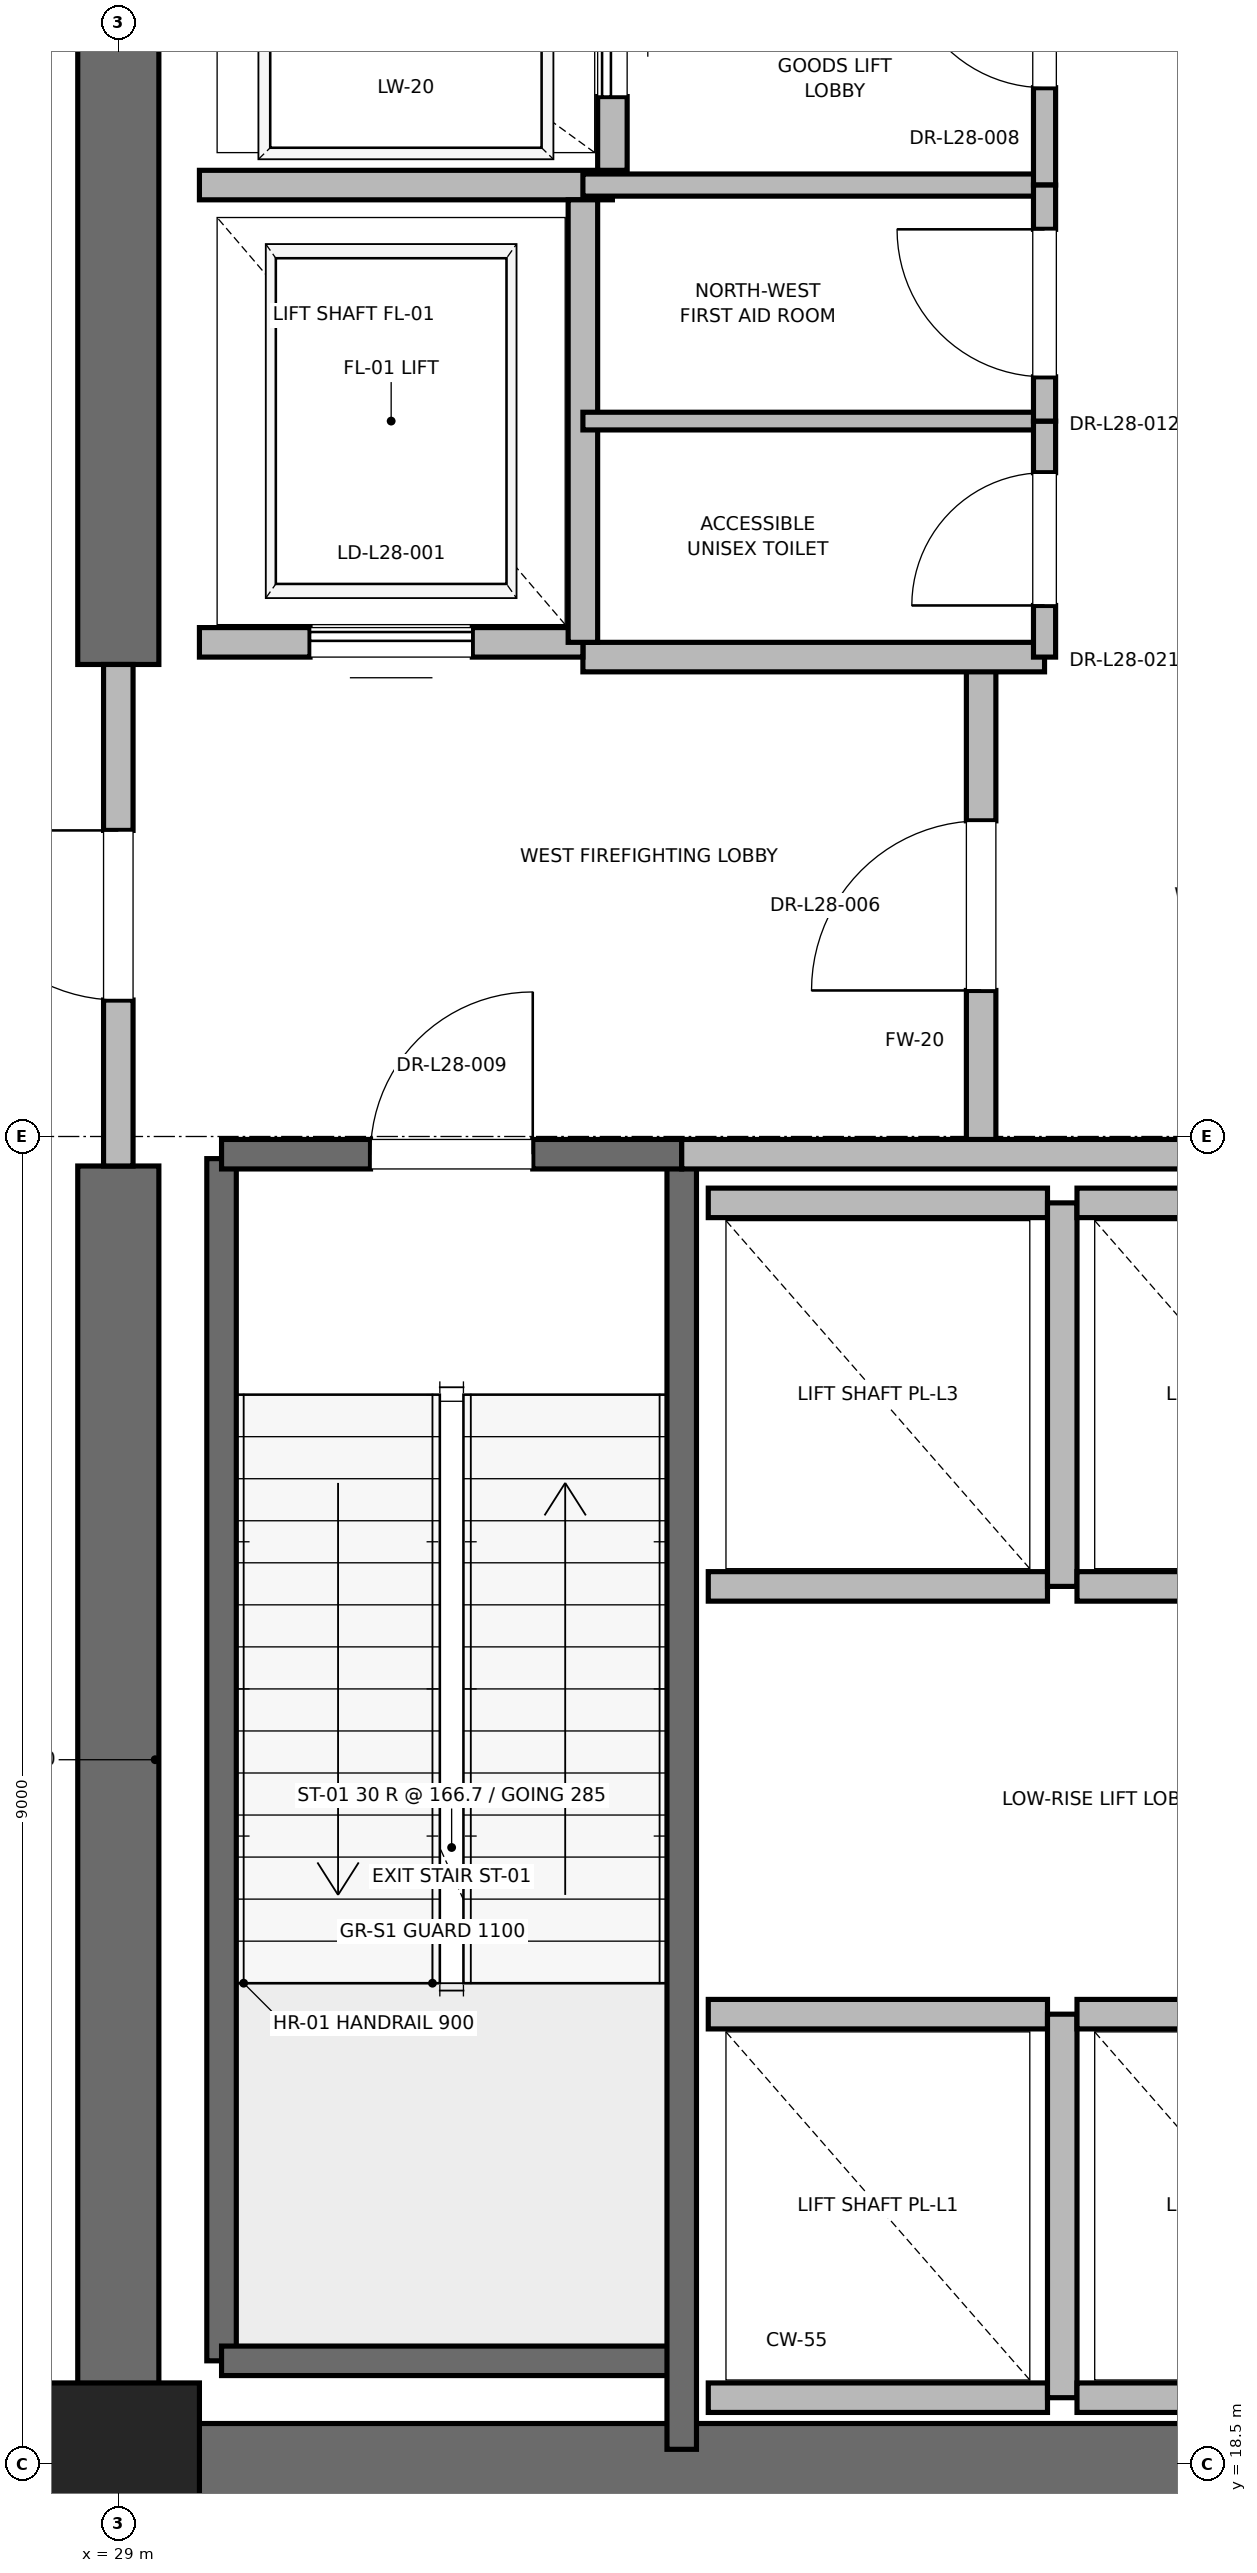
"""IFC4 building model, lengths in metres.
Left out: names, types, materials, properties, quantities, classifications, styles, units other than length and angle.
Written with IfcOpenShell. Run it as: python <this file> out.ifc"""

import sys

from ifc_helpers import new_model, si_unit, direction, frame, frame_2d, origin, origin_2d, place, context, subcontext, project, spatial, rectangle, extrude, element, fill, save


model = new_model("IFC4")
c1 = context("Model", 3, precision=1e-05, world=origin(), true_north=direction((0.0, 1.0)))
c2 = subcontext(c1, "Body", "Model", "MODEL_VIEW")
j1 = project(units=[si_unit("LENGTHUNIT", "METRE"), si_unit("PLANEANGLEUNIT", "RADIAN")], contexts=[c1])
p1 = place(None, origin())
s1 = spatial("IfcSite", under=j1, at=p1, CompositionType="ELEMENT")
p2 = place(p1, origin())
s2 = spatial("IfcBuilding", under=s1, at=p2, CompositionType="ELEMENT")
p3 = place(p2, frame((0.0, 0.0, 123.4)))
s3 = spatial("IfcBuildingStorey", under=s2, at=p3, CompositionType="ELEMENT", Elevation=123.4)
p4 = place(p3, frame((29.0, 18.5, 0.0), z_axis=(0.0, 0.0, 1.0), x_axis=(1.0, 0.0, 0.0)))
e1 = element("IfcColumn", 1, at=p4, inside=s3, PredefinedType="PILASTER", context=c2, shape_type="SweptSolid", body=[
    extrude(rectangle(XDim=1.1, YDim=1.1, at=origin_2d()), origin(), (0.0, 0.0, 1.0), 5.0),
])
p5 = place(p3, frame((29.0, 18.5, 0.0), z_axis=(0.0, 0.0, 1.0), x_axis=(1.0, 0.0, 0.0)))
e2 = element("IfcWall", 2, at=p5, inside=s3, PredefinedType="SHEAR", context=c2, shape_type="SweptSolid", body=[
    extrude(rectangle(XDim=9.2, YDim=0.55, at=frame_2d((4.6, 0.0))), origin(), (0.0, 0.0, 1.0), 4.775),
])
p6 = place(p3, frame((29.0, 18.5, 0.0), z_axis=(0.0, 0.0, 1.0), x_axis=(0.0, 1.0, 0.0)))
e3 = element("IfcWall", 3, at=p6, inside=s3, PredefinedType="SHEAR", context=c2, shape_type="SweptSolid", body=[
    extrude(rectangle(XDim=8.8, YDim=0.55, at=frame_2d((4.4, 0.0))), origin(), (0.0, 0.0, 1.0), 4.775),
])
p7 = place(p3, frame((29.0, 30.7, 0.0), z_axis=(0.0, 0.0, 1.0), x_axis=(0.0, 1.0, 0.0)))
e4 = element("IfcWall", 4, at=p7, inside=s3, PredefinedType="SHEAR", context=c2, shape_type="SweptSolid", body=[
    extrude(rectangle(XDim=5.8, YDim=0.55, at=frame_2d((2.9, 0.0))), origin(), (0.0, 0.0, 1.0), 4.775),
])
p8 = place(p3, frame((29.7, 19.2, 0.0), z_axis=(0.0, 0.0, 1.0), x_axis=(0.0, 1.0, 0.0)))
e5 = element("IfcWall", 5, at=p8, inside=s3, PredefinedType="SOLIDWALL", context=c2, shape_type="SweptSolid", body=[
    extrude(rectangle(XDim=8.15, YDim=0.2, at=frame_2d((4.075, 0.0))), origin(), (0.0, 0.0, 1.0), 4.775),
])
p9 = place(p3, frame((29.7, 19.2, 0.0), z_axis=(0.0, 0.0, 1.0), x_axis=(1.0, 0.0, 0.0)))
e6 = element("IfcWall", 6, at=p9, inside=s3, PredefinedType="SOLIDWALL", context=c2, shape_type="SweptSolid", body=[
    extrude(rectangle(XDim=3.12, YDim=0.2, at=frame_2d((1.56, 0.0))), origin(), (0.0, 0.0, 1.0), 4.775),
])
p10 = place(p3, frame((32.82, 18.6, 0.0), z_axis=(0.0, 0.0, 1.0), x_axis=(0.0, 1.0, 0.0)))
e7 = element("IfcWall", 7, at=p10, inside=s3, PredefinedType="SOLIDWALL", context=c2, shape_type="SweptSolid", body=[
    extrude(rectangle(XDim=8.78, YDim=0.2, at=frame_2d((4.39, 0.0))), origin(), (0.0, 0.0, 1.0), 4.775),
])
p11 = place(p3, frame((29.7, 27.38, 0.0), z_axis=(0.0, 0.0, 1.0), x_axis=(1.0, 0.0, 0.0)))
e8 = element("IfcWall", 8, at=p11, inside=s3, PredefinedType="SOLIDWALL", context=c2, shape_type="SweptSolid", body=[
    extrude(rectangle(XDim=3.12, YDim=0.2, at=frame_2d((1.56, 0.0))), origin(), (0.0, 0.0, 1.0), 4.775),
])
p12 = place(p11, frame((1.01, 0.0, 0.0)))
e9 = element("IfcOpeningElement", 9, at=p12, cuts=e8, PredefinedType="OPENING", context=c2, shape_type="SweptSolid", body=[
    extrude(rectangle(XDim=1.1, YDim=2.15, at=frame_2d((0.55, 1.075))), frame((0.0, 0.1, 0.0), z_axis=(0.0, -1.0, 0.0), x_axis=(1.0, 0.0, 0.0)), (0.0, 0.0, 1.0), 0.2),
])
p13 = place(p3, frame((34.85, 27.38, 0.0), z_axis=(0.0, 0.0, 1.0), x_axis=(0.0, 1.0, 0.0)))
e10 = element("IfcWall", 10, at=p13, inside=s3, PredefinedType="PARTITIONING", context=c2, shape_type="SweptSolid", body=[
    extrude(rectangle(XDim=3.37, YDim=0.2, at=frame_2d((1.685, 0.0))), origin(), (0.0, 0.0, 1.0), 4.775),
])
p14 = place(p13, frame((1.11, 0.0, 0.0)))
e11 = element("IfcOpeningElement", 11, at=p14, cuts=e10, PredefinedType="OPENING", context=c2, shape_type="SweptSolid", body=[
    extrude(rectangle(XDim=1.15, YDim=2.2, at=frame_2d((0.575, 1.1))), frame((0.0, 0.1, 0.0), z_axis=(0.0, -1.0, 0.0), x_axis=(1.0, 0.0, 0.0)), (0.0, 0.0, 1.0), 0.2),
])
p15 = place(p3, frame((29.0, 27.3, 0.0), z_axis=(0.0, 0.0, 1.0), x_axis=(0.0, 1.0, 0.0)))
e12 = element("IfcWall", 12, at=p15, inside=s3, PredefinedType="PARTITIONING", context=c2, shape_type="SweptSolid", body=[
    extrude(rectangle(XDim=3.4, YDim=0.2, at=frame_2d((1.7, 0.0))), origin(), (0.0, 0.0, 1.0), 3.755),
])
p16 = place(p15, frame((1.125, 0.0, 0.0)))
e13 = element("IfcOpeningElement", 13, at=p16, cuts=e12, PredefinedType="OPENING", context=c2, shape_type="SweptSolid", body=[
    extrude(rectangle(XDim=1.15, YDim=2.2, at=frame_2d((0.575, 1.1))), frame((0.0, 0.1, 0.0), z_axis=(0.0, -1.0, 0.0), x_axis=(1.0, 0.0, 0.0)), (0.0, 0.0, 1.0), 0.2),
])
p17 = place(p3, frame((32.82, 27.38, 0.0), z_axis=(0.0, 0.0, 1.0), x_axis=(1.0, 0.0, 0.0)))
e14 = element("IfcWall", 14, at=p17, inside=s3, PredefinedType="PARTITIONING", context=c2, shape_type="SweptSolid", body=[
    extrude(rectangle(XDim=5.62, YDim=0.2, at=frame_2d((2.81, 0.0))), origin(), (0.0, 0.0, 1.0), 4.775),
])
p18 = place(p3, frame((32.15, 30.75, 0.0), z_axis=(0.0, 0.0, 1.0), x_axis=(1.0, 0.0, 0.0)))
e15 = element("IfcWall", 15, at=p18, inside=s3, PredefinedType="PARTITIONING", context=c2, shape_type="SweptSolid", body=[
    extrude(rectangle(XDim=3.13, YDim=0.2, at=frame_2d((1.565, 0.0))), origin(), (0.0, 0.0, 1.0), 4.775),
])
p19 = place(p3, frame((29.55, 30.85, 0.0), z_axis=(0.0, 0.0, 1.0), x_axis=(1.0, 0.0, 0.0)))
e16 = element("IfcWall", 16, at=p19, inside=s3, PredefinedType="SOLIDWALL", context=c2, shape_type="SweptSolid", body=[
    extrude(rectangle(XDim=2.6, YDim=0.2, at=frame_2d((1.3, 0.0))), origin(), (0.0, 0.0, 1.0), 3.755),
])
p20 = place(p19, frame((0.75, 0.0, 0.0)))
e17 = element("IfcOpeningElement", 17, at=p20, cuts=e16, PredefinedType="OPENING", context=c2, shape_type="SweptSolid", body=[
    extrude(rectangle(XDim=1.1, YDim=2.2, at=frame_2d((0.55, 1.1))), frame((0.0, 0.1, 0.0), z_axis=(0.0, -1.0, 0.0), x_axis=(1.0, 0.0, 0.0)), (0.0, 0.0, 1.0), 0.2),
])
p21 = place(p3, frame((29.55, 33.95, 0.0), z_axis=(0.0, 0.0, 1.0), x_axis=(1.0, 0.0, 0.0)))
e18 = element("IfcWall", 18, at=p21, inside=s3, PredefinedType="SOLIDWALL", context=c2, shape_type="SweptSolid", body=[
    extrude(rectangle(XDim=2.8, YDim=0.2, at=frame_2d((1.4, 0.0))), origin(), (0.0, 0.0, 1.0), 4.775),
])
p22 = place(p3, frame((32.15, 30.85, 0.0), z_axis=(0.0, 0.0, 1.0), x_axis=(0.0, 1.0, 0.0)))
e19 = element("IfcWall", 19, at=p22, inside=s3, PredefinedType="SOLIDWALL", context=c2, shape_type="SweptSolid", body=[
    extrude(rectangle(XDim=3.0, YDim=0.2, at=frame_2d((1.5, 0.0))), origin(), (0.0, 0.0, 1.0), 4.775),
])
p23 = place(p3, frame((32.35, 34.05, 0.0), z_axis=(0.0, 0.0, 1.0), x_axis=(0.0, 1.0, 0.0)))
e20 = element("IfcWall", 20, at=p23, inside=s3, PredefinedType="SOLIDWALL", context=c2, shape_type="SweptSolid", body=[
    extrude(rectangle(XDim=2.1, YDim=0.2, at=frame_2d((1.05, 0.0))), origin(), (0.0, 0.0, 1.0), 4.775),
])
p24 = place(p23, frame((0.5, 0.0, 0.0)))
e21 = element("IfcOpeningElement", 21, at=p24, cuts=e20, PredefinedType="OPENING", context=c2, shape_type="SweptSolid", body=[
    extrude(rectangle(XDim=1.1, YDim=2.2, at=frame_2d((0.55, 1.1))), frame((0.0, 0.1, 0.0), z_axis=(0.0, -1.0, 0.0), x_axis=(1.0, 0.0, 0.0)), (0.0, 0.0, 1.0), 0.2),
])
for number, where, z_axis, x_axis in (
    (22, (33.0, 18.95, 0.0), (0.0, 0.0, 1.0), (1.0, 0.0, 0.0)),
    (23, (35.3, 21.55, 0.0), (0.0, 0.0, 1.0), (-1.0, 0.0, 0.0)),
):
    element("IfcWall", number, at=place(p3, frame(where, z_axis=z_axis, x_axis=x_axis)), inside=s3, PredefinedType="SOLIDWALL", context=c2, shape_type="SweptSolid", body=[
        extrude(rectangle(XDim=2.3, YDim=0.2, at=frame_2d((1.15, 0.0))), origin(), (0.0, 0.0, 1.0), 4.775),
    ])
p25 = place(p3, frame((35.4, 18.95, 0.0), z_axis=(0.0, 0.0, 1.0), x_axis=(0.0, 1.0, 0.0)))
e24 = element("IfcWall", 24, at=p25, inside=s3, PredefinedType="SOLIDWALL", context=c2, shape_type="SweptSolid", body=[
    extrude(rectangle(XDim=2.6, YDim=0.2, at=frame_2d((1.3, 0.0))), origin(), (0.0, 0.0, 1.0), 4.775),
])
p26 = place(p3, frame((35.5, 18.95, 0.0), z_axis=(0.0, 0.0, 1.0), x_axis=(1.0, 0.0, 0.0)))
e25 = element("IfcWall", 25, at=p26, inside=s3, PredefinedType="SOLIDWALL", context=c2, shape_type="SweptSolid", body=[
    extrude(rectangle(XDim=2.3, YDim=0.2, at=frame_2d((1.15, 0.0))), origin(), (0.0, 0.0, 1.0), 3.755),
])
for number, where, z_axis, x_axis in (
    (26, (37.8, 21.55, 0.0), (0.0, 0.0, 1.0), (-1.0, 0.0, 0.0)),
    (27, (33.0, 24.45, 0.0), (0.0, 0.0, 1.0), (1.0, 0.0, 0.0)),
    (28, (35.3, 27.05, 0.0), (0.0, 0.0, 1.0), (-1.0, 0.0, 0.0)),
):
    element("IfcWall", number, at=place(p3, frame(where, z_axis=z_axis, x_axis=x_axis)), inside=s3, PredefinedType="SOLIDWALL", context=c2, shape_type="SweptSolid", body=[
        extrude(rectangle(XDim=2.3, YDim=0.2, at=frame_2d((1.15, 0.0))), origin(), (0.0, 0.0, 1.0), 4.775),
    ])
p27 = place(p3, frame((35.4, 24.45, 0.0), z_axis=(0.0, 0.0, 1.0), x_axis=(0.0, 1.0, 0.0)))
e29 = element("IfcWall", 29, at=p27, inside=s3, PredefinedType="SOLIDWALL", context=c2, shape_type="SweptSolid", body=[
    extrude(rectangle(XDim=2.6, YDim=0.2, at=frame_2d((1.3, 0.0))), origin(), (0.0, 0.0, 1.0), 4.775),
])
for number, where, z_axis, x_axis in (
    (30, (35.5, 24.45, 0.0), (0.0, 0.0, 1.0), (1.0, 0.0, 0.0)),
    (31, (37.8, 27.05, 0.0), (0.0, 0.0, 1.0), (-1.0, 0.0, 0.0)),
):
    element("IfcWall", number, at=place(p3, frame(where, z_axis=z_axis, x_axis=x_axis)), inside=s3, PredefinedType="SOLIDWALL", context=c2, shape_type="SweptSolid", body=[
        extrude(rectangle(XDim=2.3, YDim=0.2, at=frame_2d((1.15, 0.0))), origin(), (0.0, 0.0, 1.0), 4.775),
    ])
p28 = place(p3, frame((32.15, 33.95, 0.0), z_axis=(0.0, 0.0, 1.0), x_axis=(1.0, 0.0, 0.0)))
e32 = element("IfcWall", 32, at=p28, inside=s3, PredefinedType="PARTITIONING", context=c2, shape_type="SweptSolid", body=[
    extrude(rectangle(XDim=3.13, YDim=0.15, at=frame_2d((1.565, 0.0))), origin(), (0.0, 0.0, 1.0), 2.85),
])
p29 = place(p3, frame((35.28, 33.95, 0.0), z_axis=(0.0, 0.0, 1.0), x_axis=(0.0, 1.0, 0.0)))
e33 = element("IfcWall", 33, at=p29, inside=s3, PredefinedType="PARTITIONING", context=c2, shape_type="SweptSolid", body=[
    extrude(rectangle(XDim=2.27, YDim=0.15, at=frame_2d((1.135, 0.0))), origin(), (0.0, 0.0, 1.0), 2.85),
])
p30 = place(p29, frame((0.66, 0.0, 0.0)))
e34 = element("IfcOpeningElement", 34, at=p30, cuts=e33, PredefinedType="OPENING", context=c2, shape_type="SweptSolid", body=[
    extrude(rectangle(XDim=0.95, YDim=2.15, at=frame_2d((0.475, 1.075))), frame((0.0, 0.075, 0.0), z_axis=(0.0, -1.0, 0.0), x_axis=(1.0, 0.0, 0.0)), (0.0, 0.0, 1.0), 0.15),
])
p31 = place(p3, frame((32.15, 32.35, 0.0), z_axis=(0.0, 0.0, 1.0), x_axis=(1.0, 0.0, 0.0)))
e35 = element("IfcWall", 35, at=p31, inside=s3, PredefinedType="PARTITIONING", context=c2, shape_type="SweptSolid", body=[
    extrude(rectangle(XDim=3.13, YDim=0.12, at=frame_2d((1.565, 0.0))), origin(), (0.0, 0.0, 1.0), 2.85),
])
p32 = place(p3, frame((35.28, 30.75, 0.0), z_axis=(0.0, 0.0, 1.0), x_axis=(0.0, 1.0, 0.0)))
e36 = element("IfcWall", 36, at=p32, inside=s3, PredefinedType="PARTITIONING", context=c2, shape_type="SweptSolid", body=[
    extrude(rectangle(XDim=1.6, YDim=0.15, at=frame_2d((0.8, 0.0))), origin(), (0.0, 0.0, 1.0), 2.85),
])
p33 = place(p32, frame((0.35, 0.0, 0.0)))
e37 = element("IfcOpeningElement", 37, at=p33, cuts=e36, PredefinedType="OPENING", context=c2, shape_type="SweptSolid", body=[
    extrude(rectangle(XDim=0.9, YDim=2.1, at=frame_2d((0.45, 1.05))), frame((0.0, 0.075, 0.0), z_axis=(0.0, -1.0, 0.0), x_axis=(1.0, 0.0, 0.0)), (0.0, 0.0, 1.0), 0.15),
])
p34 = place(p3, frame((35.28, 32.35, 0.0), z_axis=(0.0, 0.0, 1.0), x_axis=(0.0, 1.0, 0.0)))
e38 = element("IfcWall", 38, at=p34, inside=s3, PredefinedType="PARTITIONING", context=c2, shape_type="SweptSolid", body=[
    extrude(rectangle(XDim=1.6, YDim=0.15, at=frame_2d((0.8, 0.0))), origin(), (0.0, 0.0, 1.0), 2.85),
])
p35 = place(p34, frame((0.3, 0.0, 0.0)))
e39 = element("IfcOpeningElement", 39, at=p35, cuts=e38, PredefinedType="OPENING", context=c2, shape_type="SweptSolid", body=[
    extrude(rectangle(XDim=1.0, YDim=2.15, at=frame_2d((0.5, 1.075))), frame((0.0, 0.075, 0.0), z_axis=(0.0, -1.0, 0.0), x_axis=(1.0, 0.0, 0.0)), (0.0, 0.0, 1.0), 0.15),
])
p36 = place(p12, origin())
e40 = element("IfcDoor", 40, at=p36, inside=s3, OperationType="SINGLE_SWING_RIGHT", PredefinedType="DOOR", context=c2, shape_type="SweptSolid", body=[
    extrude(rectangle(XDim=1.1, YDim=2.15, at=frame_2d((0.55, 1.075))), frame((0.0, 0.025, 0.0), z_axis=(0.0, -1.0, 0.0), x_axis=(1.0, 0.0, 0.0)), (0.0, 0.0, 1.0), 0.05),
])
fill(e9, e40)
p37 = place(p14, origin())
e41 = element("IfcDoor", 41, at=p37, inside=s3, OperationType="SINGLE_SWING_LEFT", PredefinedType="DOOR", context=c2, shape_type="SweptSolid", body=[
    extrude(rectangle(XDim=1.15, YDim=2.2, at=frame_2d((0.575, 1.1))), frame((0.0, 0.025, 0.0), z_axis=(0.0, -1.0, 0.0), x_axis=(1.0, 0.0, 0.0)), (0.0, 0.0, 1.0), 0.05),
])
fill(e11, e41)
p38 = place(p16, origin())
e42 = element("IfcDoor", 42, at=p38, inside=s3, OperationType="SINGLE_SWING_RIGHT", PredefinedType="DOOR", context=c2, shape_type="SweptSolid", body=[
    extrude(rectangle(XDim=1.15, YDim=2.2, at=frame_2d((0.575, 1.1))), frame((0.0, 0.025, 0.0), z_axis=(0.0, -1.0, 0.0), x_axis=(1.0, 0.0, 0.0)), (0.0, 0.0, 1.0), 0.05),
])
fill(e13, e42)
p39 = place(p20, origin())
e43 = element("IfcDoor", 43, at=p39, inside=s3, OperationType="SLIDING_TO_RIGHT", PredefinedType="DOOR", context=c2, shape_type="SweptSolid", body=[
    extrude(rectangle(XDim=1.1, YDim=2.2, at=frame_2d((0.55, 1.1))), frame((0.0, 0.025, 0.0), z_axis=(0.0, -1.0, 0.0), x_axis=(1.0, 0.0, 0.0)), (0.0, 0.0, 1.0), 0.05),
])
fill(e17, e43)
p40 = place(p24, origin())
e44 = element("IfcDoor", 44, at=p40, inside=s3, OperationType="SLIDING_TO_RIGHT", PredefinedType="DOOR", context=c2, shape_type="SweptSolid", body=[
    extrude(rectangle(XDim=1.1, YDim=2.2, at=frame_2d((0.55, 1.1))), frame((0.0, 0.025, 0.0), z_axis=(0.0, -1.0, 0.0), x_axis=(1.0, 0.0, 0.0)), (0.0, 0.0, 1.0), 0.05),
])
fill(e21, e44)
p41 = place(p30, origin())
e45 = element("IfcDoor", 45, at=p41, inside=s3, OperationType="SINGLE_SWING_RIGHT", PredefinedType="DOOR", context=c2, shape_type="SweptSolid", body=[
    extrude(rectangle(XDim=0.95, YDim=2.15, at=frame_2d((0.475, 1.075))), frame((0.0, 0.025, 0.0), z_axis=(0.0, -1.0, 0.0), x_axis=(1.0, 0.0, 0.0)), (0.0, 0.0, 1.0), 0.05),
])
fill(e34, e45)
p42 = place(p33, origin())
e46 = element("IfcDoor", 46, at=p42, inside=s3, OperationType="SINGLE_SWING_LEFT", PredefinedType="DOOR", context=c2, shape_type="SweptSolid", body=[
    extrude(rectangle(XDim=0.9, YDim=2.1, at=frame_2d((0.45, 1.05))), frame((0.0, 0.025, 0.0), z_axis=(0.0, -1.0, 0.0), x_axis=(1.0, 0.0, 0.0)), (0.0, 0.0, 1.0), 0.05),
])
fill(e37, e46)
p43 = place(p35, origin())
e47 = element("IfcDoor", 47, at=p43, inside=s3, OperationType="SINGLE_SWING_RIGHT", PredefinedType="DOOR", context=c2, shape_type="SweptSolid", body=[
    extrude(rectangle(XDim=1.0, YDim=2.15, at=frame_2d((0.5, 1.075))), frame((0.0, 0.025, 0.0), z_axis=(0.0, -1.0, 0.0), x_axis=(1.0, 0.0, 0.0)), (0.0, 0.0, 1.0), 0.05),
])
fill(e39, e47)
save(model, sys.argv[1])
